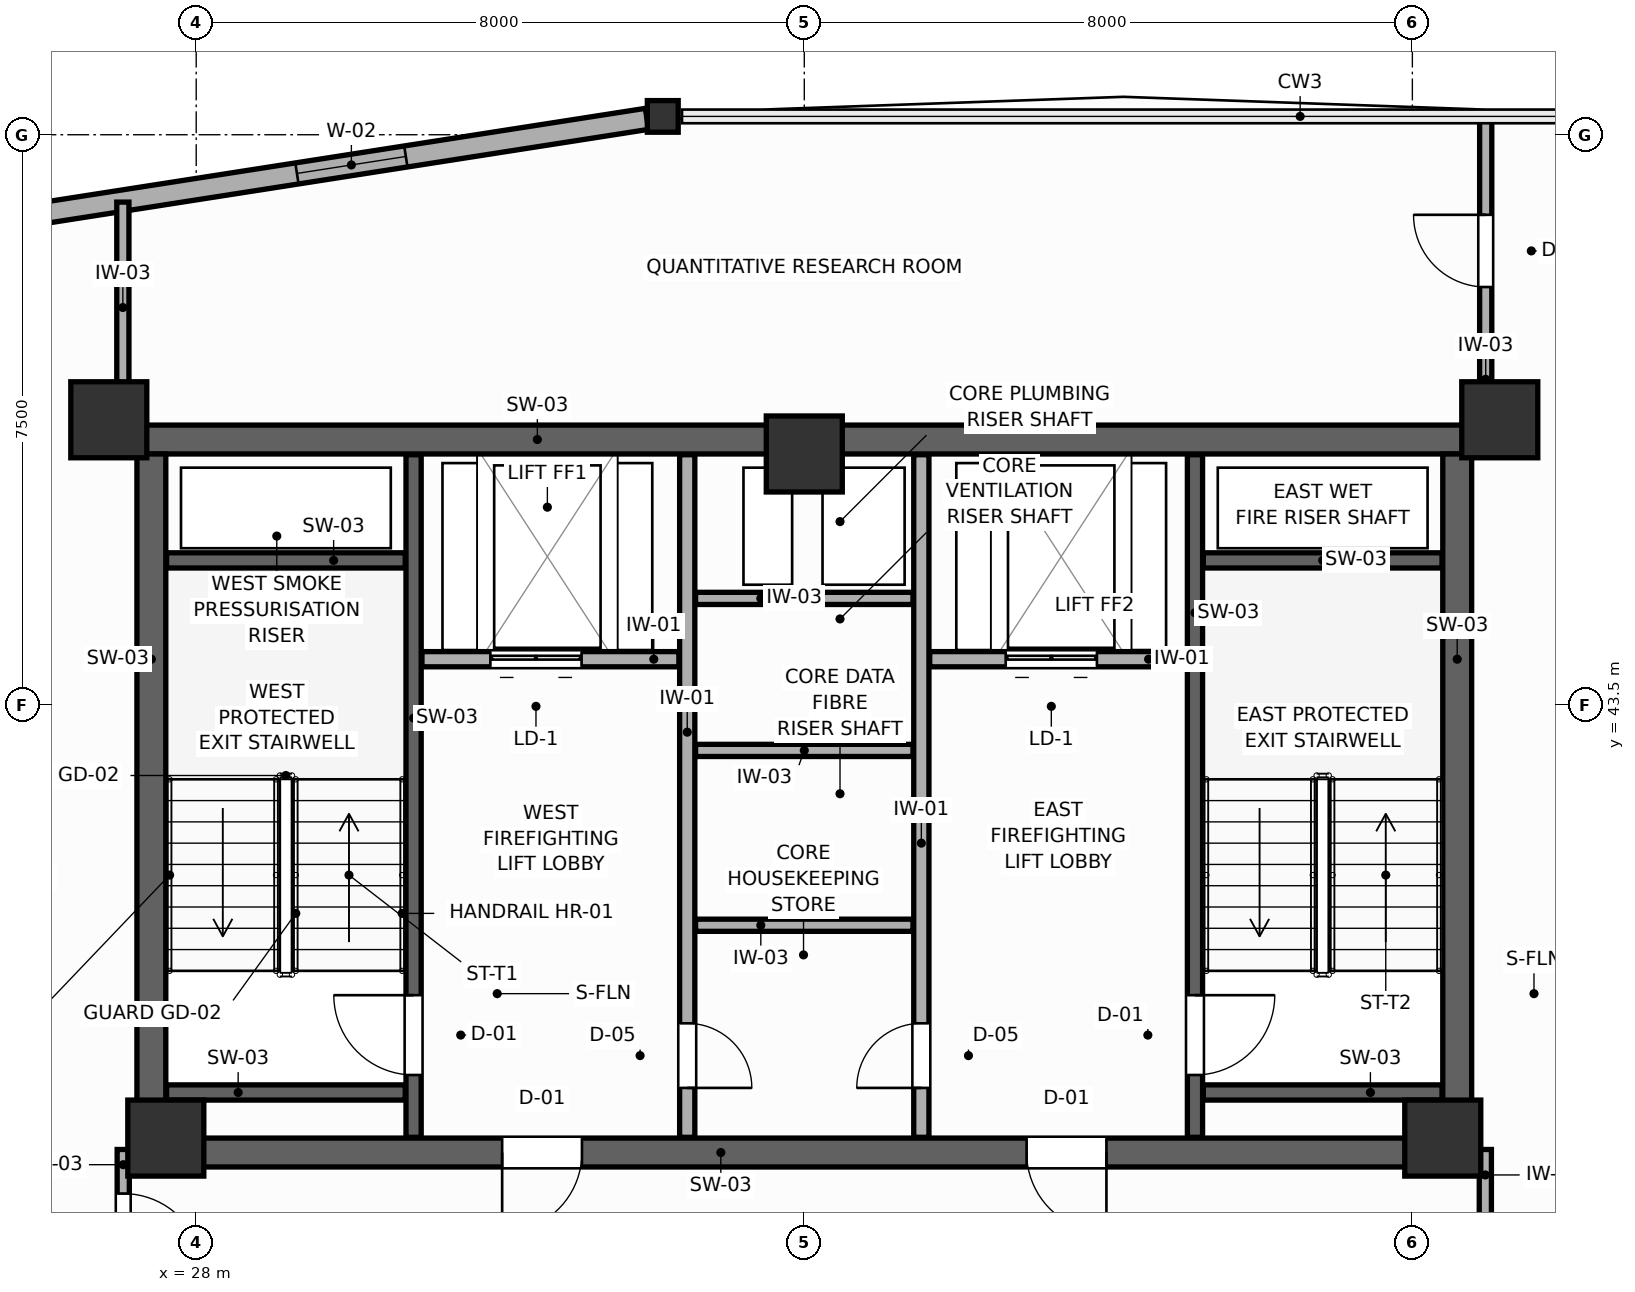
"""IFC4 building model, lengths in metres.
Left out: names, types, materials, properties, quantities, classifications, styles, units other than length and angle.
Written with IfcOpenShell. Run it as: python <this file> out.ifc"""

import sys

from ifc_helpers import new_model, si_unit, direction, frame, frame_2d, origin, origin_2d, place, context, subcontext, project, spatial, rectangle, i_section, extrude, source, transform, mapped, element, fill, save


model = new_model("IFC4")
c1 = context("Model", 3, precision=1e-05, world=origin(), true_north=direction((0.0, 1.0)))
c2 = subcontext(c1, "Body", "Model", "MODEL_VIEW")
j1 = project(units=[si_unit("LENGTHUNIT", "METRE"), si_unit("PLANEANGLEUNIT", "RADIAN")], contexts=[c1])
p1 = place(None, origin())
s1 = spatial("IfcSite", under=j1, at=p1, CompositionType="ELEMENT")
p2 = place(p1, origin())
s2 = spatial("IfcBuilding", under=s1, at=p2, CompositionType="ELEMENT")
p3 = place(p2, frame((0.0, 0.0, 231.0)))
s3 = spatial("IfcBuildingStorey", under=s2, at=p3, CompositionType="ELEMENT", Elevation=231.0)
p4 = place(p3, frame((27.22, 46.99, 0.0), z_axis=(0.0, 0.0, 1.0), x_axis=(1.0, 0.0, 0.0)))
e1 = element("IfcWall", 1, at=p4, inside=s3, PredefinedType="SHEAR", context=c2, shape_type="SweptSolid", body=[
    extrude(rectangle(XDim=17.56, YDim=0.38, at=frame_2d((8.78, 0.0))), origin(), (0.0, 0.0, 1.0), 3.6),
])
p5 = place(p3, frame((27.22, 37.61, 0.0), z_axis=(0.0, 0.0, 1.0), x_axis=(1.0, 0.0, 0.0)))
e2 = element("IfcWall", 2, at=p5, inside=s3, PredefinedType="SHEAR", context=c2, shape_type="SweptSolid", body=[
    extrude(rectangle(XDim=17.56, YDim=0.38, at=frame_2d((8.78, 0.0))), origin(), (0.0, 0.0, 1.0), 3.6),
])
p6 = place(p5, frame((4.805, 0.0, 0.0)))
e3 = element("IfcOpeningElement", 3, at=p6, cuts=e2, PredefinedType="OPENING", context=c2, shape_type="SweptSolid", body=[
    extrude(rectangle(XDim=1.05, YDim=2.1, at=frame_2d((0.525, 1.05))), frame((0.0, 0.2, 0.0), z_axis=(0.0, -1.0, 0.0), x_axis=(1.0, 0.0, 0.0)), (0.0, 0.0, 1.0), 0.4),
])
p7 = place(p5, frame((11.705, 0.0, 0.0)))
e4 = element("IfcOpeningElement", 4, at=p7, cuts=e2, PredefinedType="OPENING", context=c2, shape_type="SweptSolid", body=[
    extrude(rectangle(XDim=1.05, YDim=2.1, at=frame_2d((0.525, 1.05))), frame((0.0, 0.2, 0.0), z_axis=(0.0, -1.0, 0.0), x_axis=(1.0, 0.0, 0.0)), (0.0, 0.0, 1.0), 0.4),
])
for number, where, z_axis, x_axis in (
    (5, (27.41, 37.8, 0.0), (0.0, 0.0, 1.0), (0.0, 1.0, 0.0)),
    (6, (44.59, 37.8, 0.0), (0.0, 0.0, 1.0), (0.0, 1.0, 0.0)),
):
    element("IfcWall", number, at=place(p3, frame(where, z_axis=z_axis, x_axis=x_axis)), inside=s3, PredefinedType="SHEAR", context=c2, shape_type="SweptSolid", body=[
        extrude(rectangle(XDim=9.0, YDim=0.38, at=frame_2d((4.5, 0.0))), origin(), (0.0, 0.0, 1.0), 3.6),
    ])
m1 = source(origin(), c2, "Body", "SweptSolid", [
    extrude(rectangle(XDim=1.0, YDim=1.0, at=origin_2d()), origin(), (0.0, 0.0, 1.0), 3.6),
])
for number, where, z_axis, x_axis in (
    (7, (26.85, 47.25, 0.0), (0.0, 0.0, 1.0), (1.0, 0.0, 0.0)),
    (8, (45.15, 47.25, 0.0), (0.0, 0.0, 1.0), (1.0, 0.0, 0.0)),
    (9, (27.6, 37.8, 0.0), (0.0, 0.0, 1.0), (1.0, 0.0, 0.0)),
    (10, (44.4, 37.8, 0.0), (0.0, 0.0, 1.0), (1.0, 0.0, 0.0)),
    (11, (36.0, 46.8, 0.0), (0.0, 0.0, 1.0), (1.0, 0.0, 0.0)),
):
    element("IfcColumn", number, at=place(p3, frame(where, z_axis=z_axis, x_axis=x_axis)), inside=s3, PredefinedType="COLUMN", context=c2, shape_type="MappedRepresentation", body=[
        mapped(m1, transform((0.0, 0.0, 0.0), scale=1.0)),
    ])
m2 = source(origin(), c2, "Body", "SweptSolid", [
    extrude(i_section(OverallWidth=0.406, OverallDepth=0.416, WebThickness=0.027, FlangeThickness=0.044, FilletRadius=0.015, at=origin_2d()), origin(), (0.0, 0.0, 1.0), 3.6),
])
p8 = place(p3, frame((34.138, 51.241, 0.0), z_axis=(0.0, 0.0, 1.0), x_axis=(1.0, 0.0, 0.0)))
e12 = element("IfcColumn", 12, at=p8, inside=s3, PredefinedType="COLUMN", context=c2, shape_type="MappedRepresentation", body=[
    mapped(m2, transform((0.0, 0.0, 0.0), scale=1.0)),
])
p9 = place(p3, frame((33.93, 51.209, 0.0), z_axis=(0.0, 0.0, 1.0), x_axis=(-0.988058563106, -0.154078797613, 0.0)))
e13 = element("IfcWall", 13, at=p9, inside=s3, PredefinedType="SOLIDWALL", context=c2, shape_type="SweptSolid", body=[
    extrude(rectangle(XDim=13.492, YDim=0.28, at=frame_2d((6.746, 0.0))), origin(), (0.0, 0.0, 1.0), 2.96),
])
p10 = place(p9, frame((3.211, 0.0, 0.75)))
e14 = element("IfcOpeningElement", 14, at=p10, cuts=e13, PredefinedType="OPENING", context=c2, shape_type="SweptSolid", body=[
    extrude(rectangle(XDim=1.45, YDim=1.65, at=frame_2d((0.725, 0.825))), frame((0.0, 0.15, 0.0), z_axis=(0.0, -1.0, 0.0), x_axis=(1.0, 0.0, 0.0)), (0.0, 0.0, 1.0), 0.3),
])
p11 = place(p3, frame((30.86, 37.81, 0.0), z_axis=(0.0, 0.0, 1.0), x_axis=(0.0, 1.0, 0.0)))
e15 = element("IfcWall", 15, at=p11, inside=s3, PredefinedType="SHEAR", context=c2, shape_type="SweptSolid", body=[
    extrude(rectangle(XDim=8.98, YDim=0.2, at=frame_2d((4.49, 0.0))), origin(), (0.0, 0.0, 1.0), 3.6),
])
p12 = place(p11, frame((0.82, 0.0, 0.0)))
e16 = element("IfcOpeningElement", 16, at=p12, cuts=e15, PredefinedType="OPENING", context=c2, shape_type="SweptSolid", body=[
    extrude(rectangle(XDim=1.05, YDim=2.1, at=frame_2d((0.525, 1.05))), frame((0.0, 0.11, 0.0), z_axis=(0.0, -1.0, 0.0), x_axis=(1.0, 0.0, 0.0)), (0.0, 0.0, 1.0), 0.22),
])
for number, where, z_axis, x_axis in (
    (17, (27.61, 45.4, 0.0), (0.0, 0.0, 1.0), (1.0, 0.0, 0.0)),
    (18, (27.61, 38.4, 0.0), (0.0, 0.0, 1.0), (1.0, 0.0, 0.0)),
):
    element("IfcWall", number, at=place(p3, frame(where, z_axis=z_axis, x_axis=x_axis)), inside=s3, PredefinedType="SHEAR", context=c2, shape_type="SweptSolid", body=[
        extrude(rectangle(XDim=3.14, YDim=0.2, at=frame_2d((1.57, 0.0))), origin(), (0.0, 0.0, 1.0), 3.6),
    ])
p13 = place(p3, frame((41.14, 37.81, 0.0), z_axis=(0.0, 0.0, 1.0), x_axis=(0.0, 1.0, 0.0)))
e19 = element("IfcWall", 19, at=p13, inside=s3, PredefinedType="SHEAR", context=c2, shape_type="SweptSolid", body=[
    extrude(rectangle(XDim=8.98, YDim=0.2, at=frame_2d((4.49, 0.0))), origin(), (0.0, 0.0, 1.0), 3.6),
])
p14 = place(p13, frame((0.82, 0.0, 0.0)))
e20 = element("IfcOpeningElement", 20, at=p14, cuts=e19, PredefinedType="OPENING", context=c2, shape_type="SweptSolid", body=[
    extrude(rectangle(XDim=1.05, YDim=2.1, at=frame_2d((0.525, 1.05))), frame((0.0, 0.11, 0.0), z_axis=(0.0, -1.0, 0.0), x_axis=(1.0, 0.0, 0.0)), (0.0, 0.0, 1.0), 0.22),
])
for number, where, z_axis, x_axis in (
    (21, (41.25, 45.4, 0.0), (0.0, 0.0, 1.0), (1.0, 0.0, 0.0)),
    (22, (41.25, 38.4, 0.0), (0.0, 0.0, 1.0), (1.0, 0.0, 0.0)),
):
    element("IfcWall", number, at=place(p3, frame(where, z_axis=z_axis, x_axis=x_axis)), inside=s3, PredefinedType="SHEAR", context=c2, shape_type="SweptSolid", body=[
        extrude(rectangle(XDim=3.14, YDim=0.2, at=frame_2d((1.57, 0.0))), origin(), (0.0, 0.0, 1.0), 3.6),
    ])
p15 = place(p3, frame((30.97, 44.1, 0.0), z_axis=(0.0, 0.0, 1.0), x_axis=(1.0, 0.0, 0.0)))
e23 = element("IfcWall", 23, at=p15, inside=s3, PredefinedType="PARTITIONING", context=c2, shape_type="SweptSolid", body=[
    extrude(rectangle(XDim=3.38, YDim=0.2, at=frame_2d((1.69, 0.0))), origin(), (0.0, 0.0, 1.0), 3.41),
])
p16 = place(p15, frame((0.9, 0.0, 0.0)))
e24 = element("IfcOpeningElement", 24, at=p16, cuts=e23, PredefinedType="OPENING", context=c2, shape_type="SweptSolid", body=[
    extrude(rectangle(XDim=1.2, YDim=2.1, at=frame_2d((0.6, 1.05))), frame((0.0, 0.11, 0.0), z_axis=(0.0, -1.0, 0.0), x_axis=(1.0, 0.0, 0.0)), (0.0, 0.0, 1.0), 0.22),
])
p17 = place(p3, frame((37.65, 44.1, 0.0), z_axis=(0.0, 0.0, 1.0), x_axis=(1.0, 0.0, 0.0)))
e25 = element("IfcWall", 25, at=p17, inside=s3, PredefinedType="PARTITIONING", context=c2, shape_type="SweptSolid", body=[
    extrude(rectangle(XDim=3.38, YDim=0.2, at=frame_2d((1.69, 0.0))), origin(), (0.0, 0.0, 1.0), 3.41),
])
p18 = place(p17, frame((1.0, 0.0, 0.0)))
e26 = element("IfcOpeningElement", 26, at=p18, cuts=e25, PredefinedType="OPENING", context=c2, shape_type="SweptSolid", body=[
    extrude(rectangle(XDim=1.2, YDim=2.1, at=frame_2d((0.6, 1.05))), frame((0.0, 0.11, 0.0), z_axis=(0.0, -1.0, 0.0), x_axis=(1.0, 0.0, 0.0)), (0.0, 0.0, 1.0), 0.22),
])
p19 = place(p3, frame((34.46, 37.81, 0.0), z_axis=(0.0, 0.0, 1.0), x_axis=(0.0, 1.0, 0.0)))
e27 = element("IfcWall", 27, at=p19, inside=s3, PredefinedType="PARTITIONING", context=c2, shape_type="SweptSolid", body=[
    extrude(rectangle(XDim=8.98, YDim=0.2, at=frame_2d((4.49, 0.0))), origin(), (0.0, 0.0, 1.0), 3.41),
])
p20 = place(p19, frame((0.65, 0.0, 0.0)))
e28 = element("IfcOpeningElement", 28, at=p20, cuts=e27, PredefinedType="OPENING", context=c2, shape_type="SweptSolid", body=[
    extrude(rectangle(XDim=0.85, YDim=2.05, at=frame_2d((0.425, 1.025))), frame((0.0, 0.11, 0.0), z_axis=(0.0, -1.0, 0.0), x_axis=(1.0, 0.0, 0.0)), (0.0, 0.0, 1.0), 0.22),
])
p21 = place(p3, frame((37.54, 37.81, 0.0), z_axis=(0.0, 0.0, 1.0), x_axis=(0.0, 1.0, 0.0)))
e29 = element("IfcWall", 29, at=p21, inside=s3, PredefinedType="PARTITIONING", context=c2, shape_type="SweptSolid", body=[
    extrude(rectangle(XDim=8.98, YDim=0.2, at=frame_2d((4.49, 0.0))), origin(), (0.0, 0.0, 1.0), 3.41),
])
p22 = place(p21, frame((0.65, 0.0, 0.0)))
e30 = element("IfcOpeningElement", 30, at=p22, cuts=e29, PredefinedType="OPENING", context=c2, shape_type="SweptSolid", body=[
    extrude(rectangle(XDim=0.85, YDim=2.05, at=frame_2d((0.425, 1.025))), frame((0.0, 0.11, 0.0), z_axis=(0.0, -1.0, 0.0), x_axis=(1.0, 0.0, 0.0)), (0.0, 0.0, 1.0), 0.22),
])
for number, where, z_axis, x_axis in (
    (31, (34.57, 40.6, 0.0), (0.0, 0.0, 1.0), (1.0, 0.0, 0.0)),
    (32, (34.57, 42.9, 0.0), (0.0, 0.0, 1.0), (1.0, 0.0, 0.0)),
    (33, (34.57, 44.9, 0.0), (0.0, 0.0, 1.0), (1.0, 0.0, 0.0)),
):
    element("IfcWall", number, at=place(p3, frame(where, z_axis=z_axis, x_axis=x_axis)), inside=s3, PredefinedType="PARTITIONING", context=c2, shape_type="SweptSolid", body=[
        extrude(rectangle(XDim=2.86, YDim=0.16, at=frame_2d((1.43, 0.0))), origin(), (0.0, 0.0, 1.0), 3.41),
    ])
p23 = place(p3, frame((27.04, 35.54, 0.0), z_axis=(0.0, 0.0, 1.0), x_axis=(0.0, 1.0, 0.0)))
e34 = element("IfcWall", 34, at=p23, inside=s3, PredefinedType="PARTITIONING", context=c2, shape_type="SweptSolid", body=[
    extrude(rectangle(XDim=2.11, YDim=0.16, at=frame_2d((1.055, 0.0))), origin(), (0.0, 0.0, 1.0), 3.41),
])
p24 = place(p23, frame((0.48, 0.0, 0.0)))
e35 = element("IfcOpeningElement", 35, at=p24, cuts=e34, PredefinedType="OPENING", context=c2, shape_type="SweptSolid", body=[
    extrude(rectangle(XDim=1.05, YDim=2.1, at=frame_2d((0.525, 1.05))), frame((0.0, 0.09, 0.0), z_axis=(0.0, -1.0, 0.0), x_axis=(1.0, 0.0, 0.0)), (0.0, 0.0, 1.0), 0.18),
])
p25 = place(p3, frame((44.96, 35.0, 0.0), z_axis=(0.0, 0.0, 1.0), x_axis=(0.0, 1.0, 0.0)))
e36 = element("IfcWall", 36, at=p25, inside=s3, PredefinedType="PARTITIONING", context=c2, shape_type="SweptSolid", body=[
    extrude(rectangle(XDim=2.65, YDim=0.16, at=frame_2d((1.325, 0.0))), origin(), (0.0, 0.0, 1.0), 3.41),
])
p26 = place(p25, frame((0.75, 0.0, 0.0)))
e37 = element("IfcOpeningElement", 37, at=p26, cuts=e36, PredefinedType="OPENING", context=c2, shape_type="SweptSolid", body=[
    extrude(rectangle(XDim=1.05, YDim=2.1, at=frame_2d((0.525, 1.05))), frame((0.0, 0.09, 0.0), z_axis=(0.0, -1.0, 0.0), x_axis=(1.0, 0.0, 0.0)), (0.0, 0.0, 1.0), 0.18),
])
p27 = place(p3, frame((44.965, 47.34, 0.0), z_axis=(0.0, 0.0, 1.0), x_axis=(0.0, 1.0, 0.0)))
e38 = element("IfcWall", 38, at=p27, inside=s3, PredefinedType="PARTITIONING", context=c2, shape_type="SweptSolid", body=[
    extrude(rectangle(XDim=3.881, YDim=0.16, at=frame_2d((1.94, 0.0))), origin(), (0.0, 0.0, 1.0), 3.41),
])
p28 = place(p27, frame((1.656, 0.0, 0.0)))
e39 = element("IfcOpeningElement", 39, at=p28, cuts=e38, PredefinedType="OPENING", context=c2, shape_type="SweptSolid", body=[
    extrude(rectangle(XDim=0.95, YDim=2.05, at=frame_2d((0.475, 1.025))), frame((0.0, 0.09, 0.0), z_axis=(0.0, -1.0, 0.0), x_axis=(1.0, 0.0, 0.0)), (0.0, 0.0, 1.0), 0.18),
])
p29 = place(p3, frame((27.035, 47.34, 0.0), z_axis=(0.0, 0.0, 1.0), x_axis=(0.0, 1.0, 0.0)))
e40 = element("IfcWall", 40, at=p29, inside=s3, PredefinedType="PARTITIONING", context=c2, shape_type="SweptSolid", body=[
    extrude(rectangle(XDim=2.773, YDim=0.16, at=frame_2d((1.387, 0.0))), origin(), (0.0, 0.0, 1.0), 3.41),
])
p30 = place(p10, origin())
e41 = element("IfcWindow", 41, at=p30, inside=s3, PartitioningType="SINGLE_PANEL", PredefinedType="WINDOW", context=c2, shape_type="SweptSolid", body=[
    extrude(rectangle(XDim=1.45, YDim=1.65, at=frame_2d((0.725, 0.825))), frame((0.0, 0.03, 0.0), z_axis=(0.0, -1.0, 0.0), x_axis=(1.0, 0.0, 0.0)), (0.0, 0.0, 1.0), 0.06),
])
fill(e14, e41)
p31 = place(p12, origin())
e42 = element("IfcDoor", 42, at=p31, inside=s3, OperationType="SINGLE_SWING_RIGHT", PredefinedType="DOOR", context=c2, shape_type="SweptSolid", body=[
    extrude(rectangle(XDim=1.05, YDim=2.1, at=frame_2d((0.525, 1.05))), frame((0.0, 0.025, 0.0), z_axis=(0.0, -1.0, 0.0), x_axis=(1.0, 0.0, 0.0)), (0.0, 0.0, 1.0), 0.05),
])
fill(e16, e42)
p32 = place(p14, frame((1.05, 0.0, 0.0), z_axis=(0.0, 0.0, 1.0), x_axis=(-1.0, 0.0, 0.0)))
e43 = element("IfcDoor", 43, at=p32, inside=s3, OperationType="SINGLE_SWING_LEFT", PredefinedType="DOOR", context=c2, shape_type="SweptSolid", body=[
    extrude(rectangle(XDim=1.05, YDim=2.1, at=frame_2d((0.525, 1.05))), frame((0.0, 0.025, 0.0), z_axis=(0.0, -1.0, 0.0), x_axis=(1.0, 0.0, 0.0)), (0.0, 0.0, 1.0), 0.05),
])
fill(e20, e43)
p33 = place(p16, origin())
e44 = element("IfcDoor", 44, at=p33, inside=s3, OperationType="DOUBLE_DOOR_SLIDING", PredefinedType="DOOR", context=c2, shape_type="SweptSolid", body=[
    extrude(rectangle(XDim=1.2, YDim=2.1, at=frame_2d((0.6, 1.05))), frame((0.0, 0.025, 0.0), z_axis=(0.0, -1.0, 0.0), x_axis=(1.0, 0.0, 0.0)), (0.0, 0.0, 1.0), 0.05),
])
fill(e24, e44)
p34 = place(p18, origin())
e45 = element("IfcDoor", 45, at=p34, inside=s3, OperationType="DOUBLE_DOOR_SLIDING", PredefinedType="DOOR", context=c2, shape_type="SweptSolid", body=[
    extrude(rectangle(XDim=1.2, YDim=2.1, at=frame_2d((0.6, 1.05))), frame((0.0, 0.025, 0.0), z_axis=(0.0, -1.0, 0.0), x_axis=(1.0, 0.0, 0.0)), (0.0, 0.0, 1.0), 0.05),
])
fill(e26, e45)
p35 = place(p20, frame((0.85, 0.0, 0.0), z_axis=(0.0, 0.0, 1.0), x_axis=(-1.0, 0.0, 0.0)))
e46 = element("IfcDoor", 46, at=p35, inside=s3, OperationType="SINGLE_SWING_RIGHT", PredefinedType="DOOR", context=c2, shape_type="SweptSolid", body=[
    extrude(rectangle(XDim=0.85, YDim=2.05, at=frame_2d((0.425, 1.025))), frame((0.0, 0.025, 0.0), z_axis=(0.0, -1.0, 0.0), x_axis=(1.0, 0.0, 0.0)), (0.0, 0.0, 1.0), 0.05),
])
fill(e28, e46)
p36 = place(p22, origin())
e47 = element("IfcDoor", 47, at=p36, inside=s3, OperationType="SINGLE_SWING_LEFT", PredefinedType="DOOR", context=c2, shape_type="SweptSolid", body=[
    extrude(rectangle(XDim=0.85, YDim=2.05, at=frame_2d((0.425, 1.025))), frame((0.0, 0.025, 0.0), z_axis=(0.0, -1.0, 0.0), x_axis=(1.0, 0.0, 0.0)), (0.0, 0.0, 1.0), 0.05),
])
fill(e30, e47)
p37 = place(p24, frame((1.05, 0.0, 0.0), z_axis=(0.0, 0.0, 1.0), x_axis=(-1.0, 0.0, 0.0)))
e48 = element("IfcDoor", 48, at=p37, inside=s3, OperationType="SINGLE_SWING_RIGHT", PredefinedType="DOOR", context=c2, shape_type="SweptSolid", body=[
    extrude(rectangle(XDim=1.05, YDim=2.1, at=frame_2d((0.525, 1.05))), frame((0.0, 0.025, 0.0), z_axis=(0.0, -1.0, 0.0), x_axis=(1.0, 0.0, 0.0)), (0.0, 0.0, 1.0), 0.05),
])
fill(e35, e48)
p38 = place(p28, origin())
e49 = element("IfcDoor", 49, at=p38, inside=s3, OperationType="SINGLE_SWING_RIGHT", PredefinedType="DOOR", context=c2, shape_type="SweptSolid", body=[
    extrude(rectangle(XDim=0.95, YDim=2.05, at=frame_2d((0.475, 1.025))), frame((0.0, 0.025, 0.0), z_axis=(0.0, -1.0, 0.0), x_axis=(1.0, 0.0, 0.0)), (0.0, 0.0, 1.0), 0.05),
])
fill(e39, e49)
p39 = place(p6, frame((1.05, 0.0, 0.0), z_axis=(0.0, 0.0, 1.0), x_axis=(-1.0, 0.0, 0.0)))
e50 = element("IfcDoor", 50, at=p39, inside=s3, OperationType="SINGLE_SWING_RIGHT", PredefinedType="DOOR", context=c2, shape_type="SweptSolid", body=[
    extrude(rectangle(XDim=1.05, YDim=2.1, at=frame_2d((0.525, 1.05))), frame((0.0, 0.025, 0.0), z_axis=(0.0, -1.0, 0.0), x_axis=(1.0, 0.0, 0.0)), (0.0, 0.0, 1.0), 0.05),
])
fill(e3, e50)
p40 = place(p7, frame((1.05, 0.0, 0.0), z_axis=(0.0, 0.0, 1.0), x_axis=(-1.0, 0.0, 0.0)))
e51 = element("IfcDoor", 51, at=p40, inside=s3, OperationType="SINGLE_SWING_LEFT", PredefinedType="DOOR", context=c2, shape_type="SweptSolid", body=[
    extrude(rectangle(XDim=1.05, YDim=2.1, at=frame_2d((0.525, 1.05))), frame((0.0, 0.025, 0.0), z_axis=(0.0, -1.0, 0.0), x_axis=(1.0, 0.0, 0.0)), (0.0, 0.0, 1.0), 0.05),
])
fill(e4, e51)
save(model, sys.argv[1])
